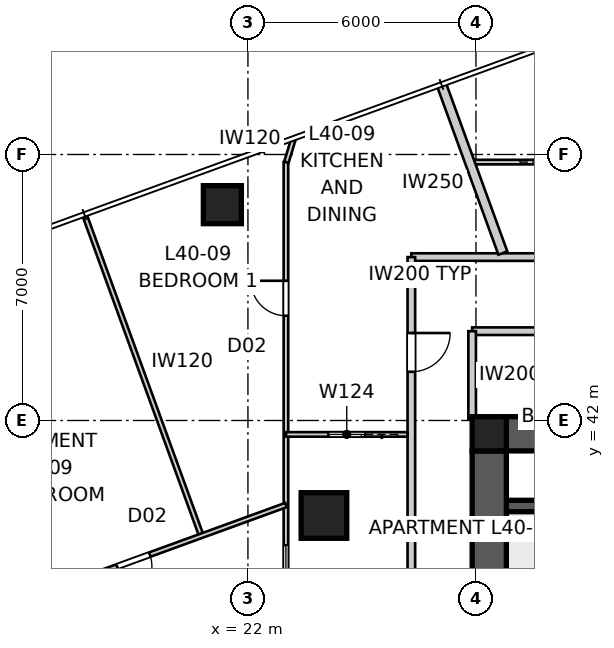
"""IFC4 building model, lengths in metres.
Left out: names, types, materials, properties, quantities, classifications, styles, units other than length and angle.
Written with IfcOpenShell. Run it as: python <this file> out.ifc"""

import sys

from ifc_helpers import new_model, si_unit, direction, frame, frame_2d, origin, origin_2d, place, context, subcontext, project, spatial, polyline, rectangle, outline, extrude, element, fill, save


model = new_model("IFC4")
c1 = context("Model", 3, precision=1e-05, world=origin(), true_north=direction((0.0, 1.0)))
c2 = subcontext(c1, "Body", "Model", "MODEL_VIEW")
j1 = project(units=[si_unit("LENGTHUNIT", "METRE"), si_unit("PLANEANGLEUNIT", "RADIAN")], contexts=[c1])
p1 = place(None, origin())
s1 = spatial("IfcSite", under=j1, at=p1, CompositionType="ELEMENT")
p2 = place(p1, origin())
s2 = spatial("IfcBuilding", under=s1, at=p2, CompositionType="ELEMENT")
p3 = place(p2, frame((0.0, 0.0, 147.2)))
s3 = spatial("IfcBuildingStorey", under=s2, at=p3, CompositionType="ELEMENT", Elevation=147.2)
p4 = place(p3, frame((28.8, 41.65, 0.0), z_axis=(0.0, 0.0, 1.0), x_axis=(1.0, 0.0, 0.0)))
e1 = element("IfcWall", 1, at=p4, inside=s3, PredefinedType="SHEAR", context=c2, shape_type="SweptSolid", body=[
    extrude(outline(polyline([(0.0, -0.45), (22.4, -0.45), (22.4, -0.025), (22.85, -0.025), (22.85, 0.025), (22.4, 0.025), (22.4, 0.45), (0.0, 0.45), (0.0, 0.025), (-0.45, 0.025), (-0.45, -0.025), (0.0, -0.025), (0.0, -0.45)])), origin(), (0.0, 0.0, 1.0), 3.4),
])
p5 = place(p3, frame((28.35, 41.2, 0.0), z_axis=(0.0, 0.0, 1.0), x_axis=(0.0, -1.0, 0.0)))
e2 = element("IfcWall", 2, at=p5, inside=s3, PredefinedType="SHEAR", context=c2, shape_type="SweptSolid", body=[
    extrude(outline(polyline([(0.0, -0.45), (22.4, -0.45), (22.4, -0.025), (22.85, -0.025), (22.85, 0.025), (22.4, 0.025), (22.4, 0.45), (0.0, 0.45), (0.0, 0.025), (-0.45, 0.025), (-0.45, -0.025), (0.0, -0.025), (0.0, -0.45)])), origin(), (0.0, 0.0, 1.0), 3.4),
])
p6 = place(p5, frame((11.14, 0.0, 0.0)))
e3 = element("IfcOpeningElement", 3, at=p6, cuts=e2, PredefinedType="OPENING", context=c2, shape_type="SweptSolid", body=[
    extrude(rectangle(XDim=1.02, YDim=2.4, at=frame_2d((0.51, 1.2))), frame((0.0, 0.46, 0.0), z_axis=(0.0, -1.0, 0.0), x_axis=(1.0, 0.0, 0.0)), (0.0, 0.0, 1.0), 0.92),
])
p7 = place(p3, frame((28.8, 39.75, 0.0), z_axis=(0.0, 0.0, 1.0), x_axis=(1.0, 0.0, 0.0)))
e4 = element("IfcWall", 4, at=p7, inside=s3, PredefinedType="SHEAR", context=c2, shape_type="SweptSolid", body=[
    extrude(rectangle(XDim=3.5, YDim=0.3, at=frame_2d((1.75, 0.0))), origin(), (0.0, 0.0, 1.0), 3.4),
])
p8 = place(p3, frame((28.35, 41.65, 0.0), z_axis=(0.0, 0.0, 1.0), x_axis=(1.0, 0.0, 0.0)))
e5 = element("IfcColumn", 5, at=p8, inside=s3, PredefinedType="COLUMN", context=c2, shape_type="SweptSolid", body=[
    extrude(rectangle(XDim=0.9, YDim=0.9, at=origin_2d()), origin(), (0.0, 0.0, 1.0), 3.4),
])
p9 = place(p3, frame((21.327, 47.68, 0.0), z_axis=(0.0, 0.0, 1.0), x_axis=(1.0, 0.0, 0.0)))
e6 = element("IfcColumn", 6, at=p9, inside=s3, PredefinedType="COLUMN", context=c2, shape_type="SweptSolid", body=[
    extrude(rectangle(XDim=1.0, YDim=1.0, at=origin_2d()), origin(), (0.0, 0.0, 1.0), 3.4),
])
p10 = place(p3, frame((24.0, 39.5, 0.0), z_axis=(0.0, 0.0, 1.0), x_axis=(1.0, 0.0, 0.0)))
e7 = element("IfcColumn", 7, at=p10, inside=s3, PredefinedType="COLUMN", context=c2, shape_type="SweptSolid", body=[
    extrude(rectangle(XDim=1.2, YDim=1.2, at=origin_2d()), origin(), (0.0, 0.0, 1.0), 3.4),
])
p11 = place(p3, frame((30.758, 46.3, 0.0), z_axis=(0.0, 0.0, 1.0), x_axis=(-1.0, 0.0, 0.0)))
e8 = element("IfcWall", 8, at=p11, inside=s3, PredefinedType="PARTITIONING", context=c2, shape_type="SweptSolid", body=[
    extrude(rectangle(XDim=4.458, YDim=0.2, at=frame_2d((2.229, 0.0))), origin(), (0.0, 0.0, 1.0), 3.25),
])
p12 = place(p3, frame((26.3, 46.3, 0.0), z_axis=(0.0, 0.0, 1.0), x_axis=(0.0, -1.0, 0.0)))
e9 = element("IfcWall", 9, at=p12, inside=s3, PredefinedType="PARTITIONING", context=c2, shape_type="SweptSolid", body=[
    extrude(rectangle(XDim=33.0, YDim=0.2, at=frame_2d((16.5, 0.0))), origin(), (0.0, 0.0, 1.0), 3.25),
])
p13 = place(p12, frame((13.229, 0.0, 0.0)))
e10 = element("IfcOpeningElement", 10, at=p13, cuts=e9, PredefinedType="OPENING", context=c2, shape_type="SweptSolid", body=[
    extrude(rectangle(XDim=1.02, YDim=2.34, at=frame_2d((0.51, 1.17))), frame((0.0, 0.11, 0.0), z_axis=(0.0, -1.0, 0.0), x_axis=(1.0, 0.0, 0.0)), (0.0, 0.0, 1.0), 0.22),
])
p14 = place(p12, frame((28.51, 0.0, 0.0)))
e11 = element("IfcOpeningElement", 11, at=p14, cuts=e9, PredefinedType="OPENING", context=c2, shape_type="SweptSolid", body=[
    extrude(rectangle(XDim=1.02, YDim=2.34, at=frame_2d((0.51, 1.17))), frame((0.0, 0.11, 0.0), z_axis=(0.0, -1.0, 0.0), x_axis=(1.0, 0.0, 0.0)), (0.0, 0.0, 1.0), 0.22),
])
p15 = place(p12, frame((1.998, 0.0, 0.0)))
e12 = element("IfcOpeningElement", 12, at=p15, cuts=e9, PredefinedType="OPENING", context=c2, shape_type="SweptSolid", body=[
    extrude(rectangle(XDim=1.02, YDim=2.34, at=frame_2d((0.51, 1.17))), frame((0.0, 0.11, 0.0), z_axis=(0.0, -1.0, 0.0), x_axis=(1.0, 0.0, 0.0)), (0.0, 0.0, 1.0), 0.22),
])
p16 = place(p3, frame((27.093, 50.843, 0.0), z_axis=(0.0, 0.0, 1.0), x_axis=(0.342012883883, -0.939695262975, 0.0)))
e13 = element("IfcWall", 13, at=p16, inside=s3, PredefinedType="PARTITIONING", context=c2, shape_type="SweptSolid", body=[
    extrude(rectangle(XDim=4.722, YDim=0.25, at=frame_2d((2.361, 0.0))), origin(), (0.0, 0.0, 1.0), 3.25),
])
p17 = place(p3, frame((52.1, 44.35, 0.0), z_axis=(0.0, 0.0, 1.0), x_axis=(-1.0, 0.0, 0.0)))
e14 = element("IfcWall", 14, at=p17, inside=s3, PredefinedType="PARTITIONING", context=c2, shape_type="SweptSolid", body=[
    extrude(rectangle(XDim=24.2, YDim=0.2, at=frame_2d((12.1, 0.0))), origin(), (0.0, 0.0, 1.0), 3.25),
])
p18 = place(p17, frame((10.743, 0.0, 0.0)))
e15 = element("IfcOpeningElement", 15, at=p18, cuts=e14, PredefinedType="OPENING", context=c2, shape_type="SweptSolid", body=[
    extrude(rectangle(XDim=1.02, YDim=2.1, at=frame_2d((0.51, 1.05))), frame((0.0, 0.11, 0.0), z_axis=(0.0, -1.0, 0.0), x_axis=(1.0, 0.0, 0.0)), (0.0, 0.0, 1.0), 0.22),
])
p19 = place(p17, frame((19.636, 0.0, 0.0)))
e16 = element("IfcOpeningElement", 16, at=p19, cuts=e14, PredefinedType="OPENING", context=c2, shape_type="SweptSolid", body=[
    extrude(rectangle(XDim=1.02, YDim=2.1, at=frame_2d((0.51, 1.05))), frame((0.0, 0.11, 0.0), z_axis=(0.0, -1.0, 0.0), x_axis=(1.0, 0.0, 0.0)), (0.0, 0.0, 1.0), 0.22),
])
p20 = place(p17, frame((3.297, 0.0, 0.0)))
e17 = element("IfcOpeningElement", 17, at=p20, cuts=e14, PredefinedType="OPENING", context=c2, shape_type="SweptSolid", body=[
    extrude(rectangle(XDim=1.02, YDim=2.1, at=frame_2d((0.51, 1.05))), frame((0.0, 0.11, 0.0), z_axis=(0.0, -1.0, 0.0), x_axis=(1.0, 0.0, 0.0)), (0.0, 0.0, 1.0), 0.22),
])
p21 = place(p3, frame((27.9, 44.35, 0.0), z_axis=(0.0, 0.0, 1.0), x_axis=(0.0, -1.0, 0.0)))
e18 = element("IfcWall", 18, at=p21, inside=s3, PredefinedType="PARTITIONING", context=c2, shape_type="SweptSolid", body=[
    extrude(rectangle(XDim=2.3, YDim=0.2, at=frame_2d((1.15, 0.0))), origin(), (0.0, 0.0, 1.0), 3.25),
])
p22 = place(p3, frame((23.0, 10.8, 0.0), z_axis=(0.0, 0.0, 1.0), x_axis=(0.0, 1.0, 0.0)))
e19 = element("IfcWall", 19, at=p22, inside=s3, PredefinedType="PARTITIONING", context=c2, shape_type="SweptSolid", body=[
    extrude(rectangle(XDim=38.0, YDim=0.12, at=frame_2d((19.0, 0.0))), origin(), (0.0, 0.0, 1.0), 2.55),
])
p23 = place(p22, frame((20.674, 0.0, 0.0)))
e20 = element("IfcOpeningElement", 20, at=p23, cuts=e19, PredefinedType="OPENING", context=c2, shape_type="SweptSolid", body=[
    extrude(rectangle(XDim=0.92, YDim=2.34, at=frame_2d((0.46, 1.17))), frame((0.0, 0.07, 0.0), z_axis=(0.0, -1.0, 0.0), x_axis=(1.0, 0.0, 0.0)), (0.0, 0.0, 1.0), 0.14),
])
p24 = place(p22, frame((4.598, 0.0, 0.0)))
e21 = element("IfcOpeningElement", 21, at=p24, cuts=e19, PredefinedType="OPENING", context=c2, shape_type="SweptSolid", body=[
    extrude(rectangle(XDim=0.92, YDim=2.34, at=frame_2d((0.46, 1.17))), frame((0.0, 0.07, 0.0), z_axis=(0.0, -1.0, 0.0), x_axis=(1.0, 0.0, 0.0)), (0.0, 0.0, 1.0), 0.14),
])
p25 = place(p22, frame((8.043, 0.0, 0.0)))
e22 = element("IfcOpeningElement", 22, at=p25, cuts=e19, PredefinedType="OPENING", context=c2, shape_type="SweptSolid", body=[
    extrude(rectangle(XDim=0.92, YDim=2.34, at=frame_2d((0.46, 1.17))), frame((0.0, 0.07, 0.0), z_axis=(0.0, -1.0, 0.0), x_axis=(1.0, 0.0, 0.0)), (0.0, 0.0, 1.0), 0.14),
])
p26 = place(p22, frame((33.957, 0.0, 0.0)))
e23 = element("IfcOpeningElement", 23, at=p26, cuts=e19, PredefinedType="OPENING", context=c2, shape_type="SweptSolid", body=[
    extrude(rectangle(XDim=0.92, YDim=2.34, at=frame_2d((0.46, 1.17))), frame((0.0, 0.07, 0.0), z_axis=(0.0, -1.0, 0.0), x_axis=(1.0, 0.0, 0.0)), (0.0, 0.0, 1.0), 0.14),
])
p27 = place(p22, frame((26.957, 0.0, 0.0)))
e24 = element("IfcOpeningElement", 24, at=p27, cuts=e19, PredefinedType="OPENING", context=c2, shape_type="SweptSolid", body=[
    extrude(rectangle(XDim=0.96, YDim=2.1, at=frame_2d((0.48, 1.05))), frame((0.0, 0.07, 0.0), z_axis=(0.0, -1.0, 0.0), x_axis=(1.0, 0.0, 0.0)), (0.0, 0.0, 1.0), 0.14),
])
p28 = place(p3, frame((27.836, 48.8, 0.0), z_axis=(0.0, 0.0, 1.0), x_axis=(1.0, 0.0, 0.0)))
e25 = element("IfcWall", 25, at=p28, inside=s3, PredefinedType="PARTITIONING", context=c2, shape_type="SweptSolid", body=[
    extrude(rectangle(XDim=6.964, YDim=0.12, at=frame_2d((3.482, 0.0))), origin(), (0.0, 0.0, 1.0), 3.25),
])
p29 = place(p28, frame((5.659, 0.0, 0.0)))
e26 = element("IfcOpeningElement", 26, at=p29, cuts=e25, PredefinedType="OPENING", context=c2, shape_type="SweptSolid", body=[
    extrude(rectangle(XDim=0.92, YDim=2.34, at=frame_2d((0.46, 1.17))), frame((0.0, 0.07, 0.0), z_axis=(0.0, -1.0, 0.0), x_axis=(1.0, 0.0, 0.0)), (0.0, 0.0, 1.0), 0.14),
])
p30 = place(p28, frame((2.18, 0.0, 0.0)))
e27 = element("IfcOpeningElement", 27, at=p30, cuts=e25, PredefinedType="OPENING", context=c2, shape_type="SweptSolid", body=[
    extrude(rectangle(XDim=0.96, YDim=2.1, at=frame_2d((0.48, 1.05))), frame((0.0, 0.07, 0.0), z_axis=(0.0, -1.0, 0.0), x_axis=(1.0, 0.0, 0.0)), (0.0, 0.0, 1.0), 0.14),
])
p31 = place(p3, frame((26.2, 41.634, 0.0), z_axis=(0.0, 0.0, 1.0), x_axis=(-1.0, 0.0, 0.0)))
e28 = element("IfcWall", 28, at=p31, inside=s3, PredefinedType="PARTITIONING", context=c2, shape_type="SweptSolid", body=[
    extrude(rectangle(XDim=3.2, YDim=0.12, at=frame_2d((1.6, 0.0))), origin(), (0.0, 0.0, 1.0), 3.25),
])
p32 = place(p31, frame((1.12, 0.0, 0.0)))
e29 = element("IfcOpeningElement", 29, at=p32, cuts=e28, PredefinedType="OPENING", context=c2, shape_type="SweptSolid", body=[
    extrude(rectangle(XDim=0.96, YDim=2.1, at=frame_2d((0.48, 1.05))), frame((0.0, 0.07, 0.0), z_axis=(0.0, -1.0, 0.0), x_axis=(1.0, 0.0, 0.0)), (0.0, 0.0, 1.0), 0.14),
])
p33 = place(p3, frame((23.013, 48.8, 0.0), z_axis=(0.0, 0.0, 1.0), x_axis=(0.290455219909, 0.956888585588, 0.0)))
e30 = element("IfcWall", 30, at=p33, inside=s3, PredefinedType="PARTITIONING", context=c2, shape_type="SweptSolid", body=[
    extrude(rectangle(XDim=0.605, YDim=0.12, at=frame_2d((0.303, 0.0))), origin(), (0.0, 0.0, 1.0), 3.25),
])
p34 = place(p3, frame((17.71, 47.385, 0.0), z_axis=(0.0, 0.0, 1.0), x_axis=(0.342038393654, -0.939685978009, 0.0)))
e31 = element("IfcWall", 31, at=p34, inside=s3, PredefinedType="PARTITIONING", context=c2, shape_type="SweptSolid", body=[
    extrude(rectangle(XDim=8.96, YDim=0.12, at=frame_2d((4.48, 0.0))), origin(), (0.0, 0.0, 1.0), 3.25),
])
p35 = place(p3, frame((23.0, 39.775, 0.0), z_axis=(0.0, 0.0, 1.0), x_axis=(-0.939693965364, -0.342016449105, 0.0)))
e32 = element("IfcWall", 32, at=p35, inside=s3, PredefinedType="PARTITIONING", context=c2, shape_type="SweptSolid", body=[
    extrude(rectangle(XDim=11.328, YDim=0.12, at=frame_2d((5.664, 0.0))), origin(), (0.0, 0.0, 1.0), 3.25),
])
p36 = place(p35, frame((3.812, 0.0, 0.0)))
e33 = element("IfcOpeningElement", 33, at=p36, cuts=e32, PredefinedType="OPENING", context=c2, shape_type="SweptSolid", body=[
    extrude(rectangle(XDim=0.92, YDim=2.34, at=frame_2d((0.46, 1.17))), frame((0.0, 0.07, 0.0), z_axis=(0.0, -1.0, 0.0), x_axis=(1.0, 0.0, 0.0)), (0.0, 0.0, 1.0), 0.14),
])
p37 = place(p15, origin())
e34 = element("IfcDoor", 34, at=p37, inside=s3, OperationType="SINGLE_SWING_LEFT", PredefinedType="DOOR", context=c2, shape_type="SweptSolid", body=[
    extrude(rectangle(XDim=1.02, YDim=2.34, at=frame_2d((0.51, 1.17))), frame((0.0, 0.025, 0.0), z_axis=(0.0, -1.0, 0.0), x_axis=(1.0, 0.0, 0.0)), (0.0, 0.0, 1.0), 0.05),
])
fill(e12, e34)
p38 = place(p26, origin())
e35 = element("IfcDoor", 35, at=p38, inside=s3, OperationType="SINGLE_SWING_RIGHT", PredefinedType="DOOR", context=c2, shape_type="SweptSolid", body=[
    extrude(rectangle(XDim=0.92, YDim=2.34, at=frame_2d((0.46, 1.17))), frame((0.0, 0.025, 0.0), z_axis=(0.0, -1.0, 0.0), x_axis=(1.0, 0.0, 0.0)), (0.0, 0.0, 1.0), 0.05),
])
fill(e23, e35)
p39 = place(p32, origin())
e36 = element("IfcDoor", 36, at=p39, inside=s3, OperationType="SLIDING_TO_LEFT", PredefinedType="DOOR", context=c2, shape_type="SweptSolid", body=[
    extrude(rectangle(XDim=0.96, YDim=2.1, at=frame_2d((0.48, 1.05))), frame((0.0, 0.025, 0.0), z_axis=(0.0, -1.0, 0.0), x_axis=(1.0, 0.0, 0.0)), (0.0, 0.0, 1.0), 0.05),
])
fill(e29, e36)
p40 = place(p27, origin())
e37 = element("IfcDoor", 37, at=p40, inside=s3, OperationType="SLIDING_TO_LEFT", PredefinedType="DOOR", context=c2, shape_type="SweptSolid", body=[
    extrude(rectangle(XDim=0.96, YDim=2.1, at=frame_2d((0.48, 1.05))), frame((0.0, 0.025, 0.0), z_axis=(0.0, -1.0, 0.0), x_axis=(1.0, 0.0, 0.0)), (0.0, 0.0, 1.0), 0.05),
])
fill(e24, e37)
p41 = place(p36, origin())
e38 = element("IfcDoor", 38, at=p41, inside=s3, OperationType="SINGLE_SWING_RIGHT", PredefinedType="DOOR", context=c2, shape_type="SweptSolid", body=[
    extrude(rectangle(XDim=0.92, YDim=2.34, at=frame_2d((0.46, 1.17))), frame((0.0, 0.025, 0.0), z_axis=(0.0, -1.0, 0.0), x_axis=(1.0, 0.0, 0.0)), (0.0, 0.0, 1.0), 0.05),
])
fill(e33, e38)
save(model, sys.argv[1])
